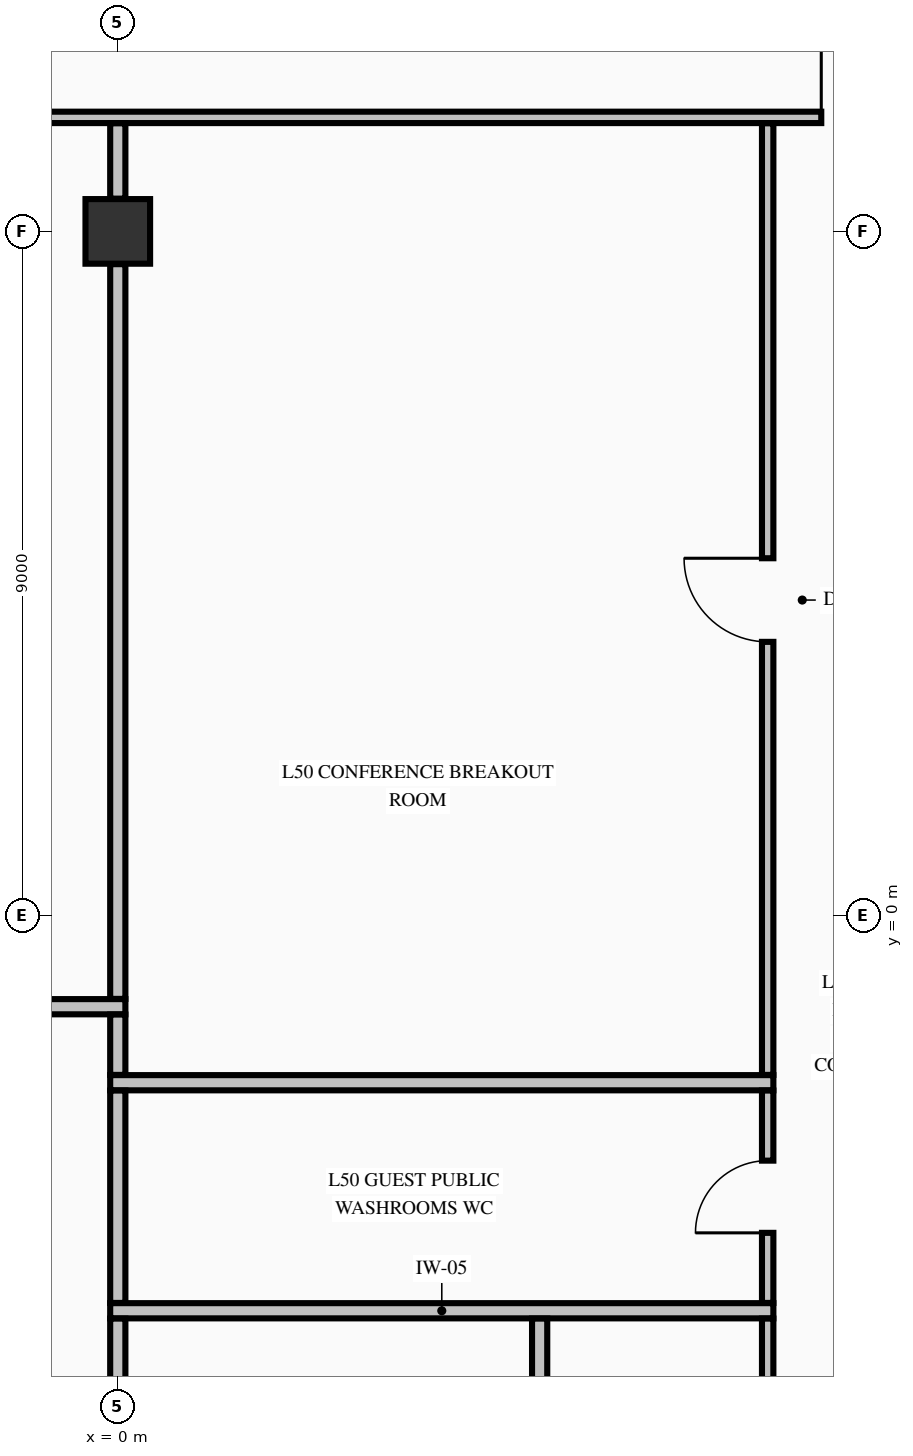
"""IFC4 building model, lengths in metres.
Left out: names, types, materials, properties, quantities, classifications, styles, units other than length and angle.
Written with IfcOpenShell. Run it as: python <this file> out.ifc"""

import sys

from ifc_helpers import new_model, si_unit, direction, frame, frame_2d, origin, origin_2d, place, context, subcontext, project, spatial, rectangle, extrude, element, fill, save


model = new_model("IFC4")
c1 = context("Model", 3, precision=1e-05, world=origin(), true_north=direction((0.0, 1.0)))
c2 = subcontext(c1, "Body", "Model", "MODEL_VIEW")
j1 = project(units=[si_unit("LENGTHUNIT", "METRE"), si_unit("PLANEANGLEUNIT", "RADIAN")], contexts=[c1])
p1 = place(None, origin())
s1 = spatial("IfcSite", under=j1, at=p1, CompositionType="ELEMENT")
p2 = place(p1, origin())
s2 = spatial("IfcBuilding", under=s1, at=p2, CompositionType="ELEMENT")
p3 = place(p2, frame((0.0, 0.0, 194.86)))
s3 = spatial("IfcBuildingStorey", under=s2, at=p3, CompositionType="ELEMENT", Elevation=194.86)
p4 = place(p3, frame((0.0, 9.0, -0.275), z_axis=(0.0, 0.0, 1.0), x_axis=(1.0, 0.0, 0.0)))
e1 = element("IfcColumn", 1, at=p4, inside=s3, PredefinedType="COLUMN", context=c2, shape_type="SweptSolid", body=[
    extrude(rectangle(XDim=0.85, YDim=0.85, at=origin_2d()), origin(), (0.0, 0.0, 1.0), 3.425),
])
for number, where, z_axis, x_axis in (
    (2, (-0.1, -5.2, 0.0), (0.0, 0.0, 1.0), (1.0, 0.0, 0.0)),
    (3, (-0.1, -2.2, 0.0), (0.0, 0.0, 1.0), (1.0, 0.0, 0.0)),
    (4, (-8.625, -1.2, 0.0), (0.0, 0.0, 1.0), (1.0, 0.0, 0.0)),
):
    element("IfcWall", number, at=place(p3, frame(where, z_axis=z_axis, x_axis=x_axis)), inside=s3, PredefinedType="PARTITIONING", context=c2, shape_type="SweptSolid", body=[
        extrude(rectangle(XDim=8.725, YDim=0.2, at=frame_2d((4.363, 0.0))), origin(), (0.0, 0.0, 1.0), 3.15),
    ])
p5 = place(p3, frame((-10.569, 10.5, 0.0), z_axis=(0.0, 0.0, 1.0), x_axis=(1.0, 0.0, 0.0)))
e5 = element("IfcWall", 5, at=p5, inside=s3, PredefinedType="PARTITIONING", context=c2, shape_type="SweptSolid", body=[
    extrude(rectangle(XDim=21.138, YDim=0.15, at=frame_2d((10.569, 0.0))), origin(), (0.0, 0.0, 1.0), 3.15),
])
p6 = place(p5, frame((0.264, 0.0, 0.0)))
e6 = element("IfcOpeningElement", 6, at=p6, cuts=e5, PredefinedType="OPENING", context=c2, shape_type="SweptSolid", body=[
    extrude(rectangle(XDim=1.05, YDim=2.15, at=frame_2d((0.525, 1.075))), frame((0.0, 0.085, 0.0), z_axis=(0.0, -1.0, 0.0), x_axis=(1.0, 0.0, 0.0)), (0.0, 0.0, 1.0), 0.17),
])
p7 = place(p5, frame((19.824, 0.0, 0.0)))
e7 = element("IfcOpeningElement", 7, at=p7, cuts=e5, PredefinedType="OPENING", context=c2, shape_type="SweptSolid", body=[
    extrude(rectangle(XDim=1.05, YDim=2.15, at=frame_2d((0.525, 1.075))), frame((0.0, 0.085, 0.0), z_axis=(0.0, -1.0, 0.0), x_axis=(1.0, 0.0, 0.0)), (0.0, 0.0, 1.0), 0.17),
])
p8 = place(p3, frame((0.0, -8.569, 0.0), z_axis=(0.0, 0.0, 1.0), x_axis=(0.0, 1.0, 0.0)))
e8 = element("IfcWall", 8, at=p8, inside=s3, PredefinedType="PARTITIONING", context=c2, shape_type="SweptSolid", body=[
    extrude(rectangle(XDim=3.266, YDim=0.2, at=frame_2d((1.633, 0.0))), origin(), (0.0, 0.0, 1.0), 2.342),
])
p9 = place(p3, frame((0.0, -5.097, 0.0), z_axis=(0.0, 0.0, 1.0), x_axis=(0.0, 1.0, 0.0)))
e9 = element("IfcWall", 9, at=p9, inside=s3, PredefinedType="PARTITIONING", context=c2, shape_type="SweptSolid", body=[
    extrude(rectangle(XDim=2.794, YDim=0.2, at=frame_2d((1.397, 0.0))), origin(), (0.0, 0.0, 1.0), 2.342),
])
p10 = place(p3, frame((0.0, -2.097, 0.0), z_axis=(0.0, 0.0, 1.0), x_axis=(0.0, 1.0, 0.0)))
e10 = element("IfcWall", 10, at=p10, inside=s3, PredefinedType="PARTITIONING", context=c2, shape_type="SweptSolid", body=[
    extrude(rectangle(XDim=0.794, YDim=0.2, at=frame_2d((0.397, 0.0))), origin(), (0.0, 0.0, 1.0), 2.342),
])
p11 = place(p3, frame((0.0, -1.097, 0.0), z_axis=(0.0, 0.0, 1.0), x_axis=(0.0, 1.0, 0.0)))
e11 = element("IfcWall", 11, at=p11, inside=s3, PredefinedType="PARTITIONING", context=c2, shape_type="SweptSolid", body=[
    extrude(rectangle(XDim=9.666, YDim=0.2, at=frame_2d((4.833, 0.0))), origin(), (0.0, 0.0, 1.0), 2.342),
])
p12 = place(p3, frame((0.0, 9.431, 0.0), z_axis=(0.0, 0.0, 1.0), x_axis=(0.0, 1.0, 0.0)))
e12 = element("IfcWall", 12, at=p12, inside=s3, PredefinedType="PARTITIONING", context=c2, shape_type="SweptSolid", body=[
    extrude(rectangle(XDim=0.991, YDim=0.2, at=frame_2d((0.496, 0.0))), origin(), (0.0, 0.0, 1.0), 2.342),
])
p13 = place(p3, frame((5.55, -9.872, 0.0), z_axis=(0.0, 0.0, 1.0), x_axis=(0.0, 1.0, 0.0)))
e13 = element("IfcWall", 13, at=p13, inside=s3, PredefinedType="PARTITIONING", context=c2, shape_type="SweptSolid", body=[
    extrude(rectangle(XDim=4.569, YDim=0.2, at=frame_2d((2.285, 0.0))), origin(), (0.0, 0.0, 1.0), 3.15),
])
p14 = place(p3, frame((8.55, -9.872, 0.0), z_axis=(0.0, 0.0, 1.0), x_axis=(0.0, 1.0, 0.0)))
e14 = element("IfcWall", 14, at=p14, inside=s3, PredefinedType="PARTITIONING", context=c2, shape_type="SweptSolid", body=[
    extrude(rectangle(XDim=4.569, YDim=0.15, at=frame_2d((2.285, 0.0))), origin(), (0.0, 0.0, 1.0), 3.15),
])
p15 = place(p14, frame((1.847, 0.0, 0.0)))
e15 = element("IfcOpeningElement", 15, at=p15, cuts=e14, PredefinedType="OPENING", context=c2, shape_type="SweptSolid", body=[
    extrude(rectangle(XDim=0.95, YDim=2.15, at=frame_2d((0.475, 1.075))), frame((0.0, 0.085, 0.0), z_axis=(0.0, -1.0, 0.0), x_axis=(1.0, 0.0, 0.0)), (0.0, 0.0, 1.0), 0.17),
])
p16 = place(p3, frame((8.55, -5.097, 0.0), z_axis=(0.0, 0.0, 1.0), x_axis=(0.0, 1.0, 0.0)))
e16 = element("IfcWall", 16, at=p16, inside=s3, PredefinedType="PARTITIONING", context=c2, shape_type="SweptSolid", body=[
    extrude(rectangle(XDim=2.794, YDim=0.15, at=frame_2d((1.397, 0.0))), origin(), (0.0, 0.0, 1.0), 3.15),
])
p17 = place(p16, frame((0.922, 0.0, 0.0)))
e17 = element("IfcOpeningElement", 17, at=p17, cuts=e16, PredefinedType="OPENING", context=c2, shape_type="SweptSolid", body=[
    extrude(rectangle(XDim=0.95, YDim=2.15, at=frame_2d((0.475, 1.075))), frame((0.0, 0.085, 0.0), z_axis=(0.0, -1.0, 0.0), x_axis=(1.0, 0.0, 0.0)), (0.0, 0.0, 1.0), 0.17),
])
p18 = place(p3, frame((8.55, -2.097, 0.0), z_axis=(0.0, 0.0, 1.0), x_axis=(0.0, 1.0, 0.0)))
e18 = element("IfcWall", 18, at=p18, inside=s3, PredefinedType="PARTITIONING", context=c2, shape_type="SweptSolid", body=[
    extrude(rectangle(XDim=12.519, YDim=0.15, at=frame_2d((6.26, 0.0))), origin(), (0.0, 0.0, 1.0), 3.15),
])
p19 = place(p18, frame((5.697, 0.0, 0.0)))
e19 = element("IfcOpeningElement", 19, at=p19, cuts=e18, PredefinedType="OPENING", context=c2, shape_type="SweptSolid", body=[
    extrude(rectangle(XDim=1.1, YDim=2.15, at=frame_2d((0.55, 1.075))), frame((0.0, 0.085, 0.0), z_axis=(0.0, -1.0, 0.0), x_axis=(1.0, 0.0, 0.0)), (0.0, 0.0, 1.0), 0.17),
])
p20 = place(p7, origin())
e20 = element("IfcDoor", 20, at=p20, inside=s3, OperationType="SINGLE_SWING_LEFT", PredefinedType="DOOR", context=c2, shape_type="SweptSolid", body=[
    extrude(rectangle(XDim=1.05, YDim=2.15, at=frame_2d((0.525, 1.075))), frame((0.0, 0.025, 0.0), z_axis=(0.0, -1.0, 0.0), x_axis=(1.0, 0.0, 0.0)), (0.0, 0.0, 1.0), 0.05),
])
fill(e7, e20)
p21 = place(p19, origin())
e21 = element("IfcDoor", 21, at=p21, inside=s3, OperationType="SINGLE_SWING_RIGHT", PredefinedType="DOOR", context=c2, shape_type="SweptSolid", body=[
    extrude(rectangle(XDim=1.1, YDim=2.15, at=frame_2d((0.55, 1.075))), frame((0.0, 0.025, 0.0), z_axis=(0.0, -1.0, 0.0), x_axis=(1.0, 0.0, 0.0)), (0.0, 0.0, 1.0), 0.05),
])
fill(e19, e21)
p22 = place(p17, origin())
e22 = element("IfcDoor", 22, at=p22, inside=s3, OperationType="SINGLE_SWING_LEFT", PredefinedType="DOOR", context=c2, shape_type="SweptSolid", body=[
    extrude(rectangle(XDim=0.95, YDim=2.15, at=frame_2d((0.475, 1.075))), frame((0.0, 0.025, 0.0), z_axis=(0.0, -1.0, 0.0), x_axis=(1.0, 0.0, 0.0)), (0.0, 0.0, 1.0), 0.05),
])
fill(e17, e22)
save(model, sys.argv[1])
